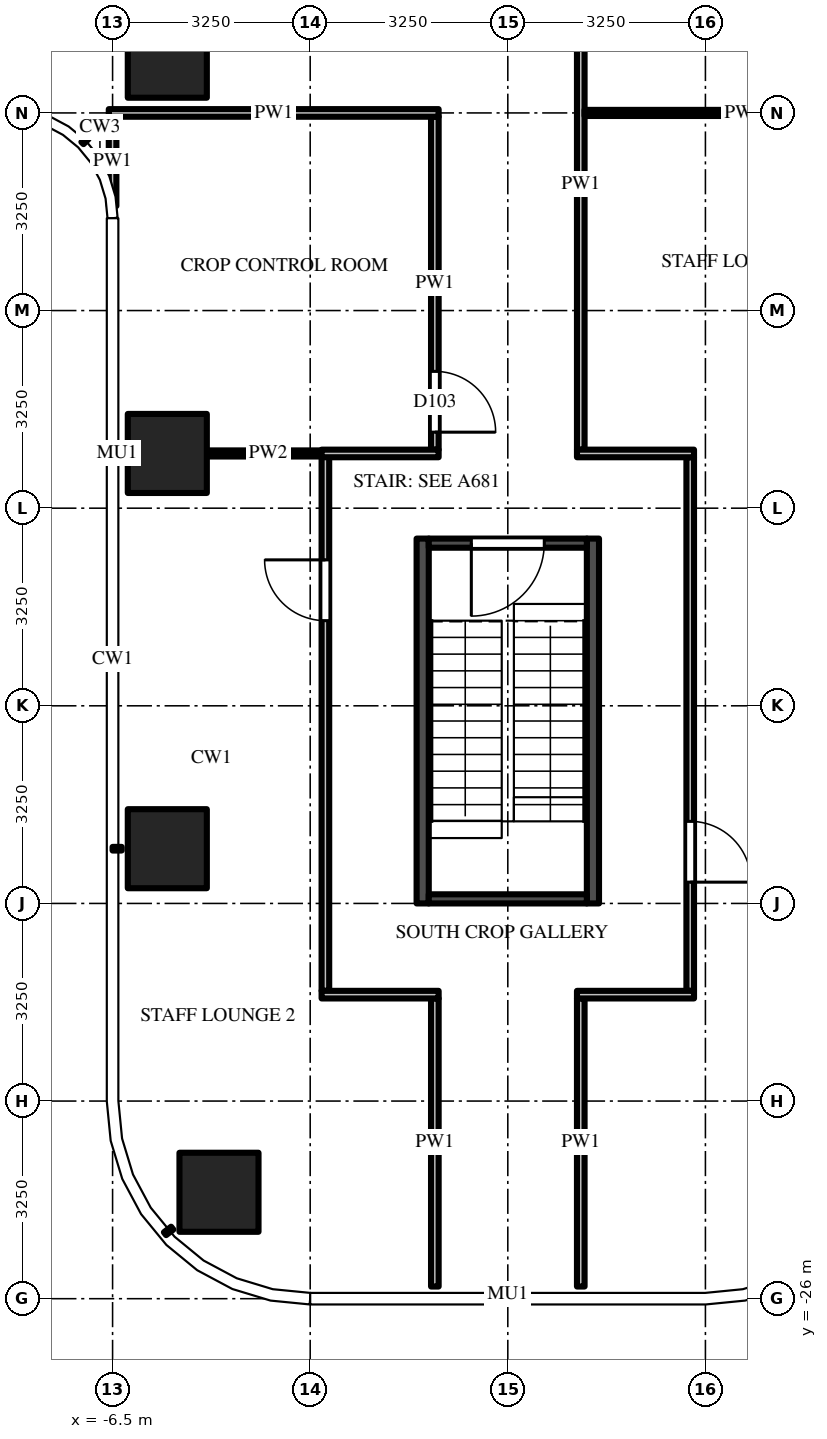
"""IFC4 building model, lengths in metres.
Left out: names, types, materials, properties, quantities, classifications, styles, units other than length and angle.
Written with IfcOpenShell. Run it as: python <this file> out.ifc"""

import sys

from ifc_helpers import new_model, si_unit, direction, frame, frame_2d, origin, origin_2d, place, context, subcontext, project, spatial, rectangle, extrude, source, transform, mapped, element, fill, save


model = new_model("IFC4")
c1 = context("Model", 3, precision=1e-05, world=origin(), true_north=direction((0.0, 1.0)))
c2 = subcontext(c1, "Body", "Model", "MODEL_VIEW")
j1 = project(units=[si_unit("LENGTHUNIT", "METRE"), si_unit("PLANEANGLEUNIT", "RADIAN")], contexts=[c1])
p1 = place(None, origin())
s1 = spatial("IfcSite", under=j1, at=p1, CompositionType="ELEMENT")
p2 = place(p1, origin())
s2 = spatial("IfcBuilding", under=s1, at=p2, CompositionType="ELEMENT")
p3 = place(p2, frame((0.0, 0.0, 151.5)))
s3 = spatial("IfcBuildingStorey", under=s2, at=p3, CompositionType="ELEMENT", Elevation=151.5)
m1 = source(origin(), c2, "Body", "SweptSolid", [
    extrude(rectangle(XDim=1.3, YDim=1.3, at=origin_2d()), origin(), (0.0, 0.0, 1.0), 4.5),
])
for number, where, z_axis, x_axis in (
    (1, (-5.6, -5.6, 0.0), (0.0, 0.0, 1.0), (1.0, 0.0, 0.0)),
    (2, (-5.6, -12.1, 0.0), (0.0, 0.0, 1.0), (1.0, 0.0, 0.0)),
    (3, (-5.6, -18.6, 0.0), (0.0, 0.0, 1.0), (1.0, 0.0, 0.0)),
    (4, (-4.75, -24.25, 0.0), (0.0, 0.0, 1.0), (1.0, 0.0, 0.0)),
):
    element("IfcColumn", number, at=place(p3, frame(where, z_axis=z_axis, x_axis=x_axis)), inside=s3, PredefinedType="COLUMN", context=c2, shape_type="MappedRepresentation", body=[
        mapped(m1, transform((0.0, 0.0, 0.0))),
    ])
m2 = source(origin(), c2, "Body", "SweptSolid", [
    extrude(rectangle(XDim=6.0, YDim=0.2, at=frame_2d((3.0, 0.0))), origin(), (0.0, 0.0, 1.0), 4.15),
])
for number, where, z_axis, x_axis in (
    (5, (1.4, -13.5, 0.0), (0.0, 0.0, 1.0), (0.0, -1.0, 0.0)),
    (6, (-1.4, -13.5, 0.0), (0.0, 0.0, 1.0), (0.0, -1.0, 0.0)),
):
    element("IfcWall", number, at=place(p3, frame(where, z_axis=z_axis, x_axis=x_axis)), inside=s3, PredefinedType="SHEAR", context=c2, shape_type="MappedRepresentation", body=[
        mapped(m2, transform((0.0, 0.0, 0.0))),
    ])
m3 = source(origin(), c2, "Body", "SweptSolid", [
    extrude(rectangle(XDim=2.6, YDim=0.15, at=frame_2d((1.3, 0.0))), origin(), (0.0, 0.0, 1.0), 4.15),
])
p4 = place(p3, frame((1.3, -13.575, 0.0), z_axis=(0.0, 0.0, 1.0), x_axis=(-1.0, 0.0, 0.0)))
e7 = element("IfcWall", 7, at=p4, inside=s3, PredefinedType="SHEAR", context=c2, shape_type="MappedRepresentation", body=[
    mapped(m3, transform((0.0, 0.0, 0.0))),
])
m4 = source(origin(), c2, "Body", "SweptSolid", [
    extrude(rectangle(XDim=1.2, YDim=2.1, at=frame_2d((0.6, 1.05))), frame((0.0, 0.085, 0.0), z_axis=(0.0, -1.0, 0.0), x_axis=(1.0, 0.0, 0.0)), (0.0, 0.0, 1.0), 0.17),
])
p5 = place(p4, frame((0.7, 0.0, 0.0)))
e8 = element("IfcOpeningElement", 8, at=p5, cuts=e7, PredefinedType="OPENING", context=c2, shape_type="MappedRepresentation", body=[
    mapped(m4, transform((0.0, 0.0, 0.0))),
])
p6 = place(p3, frame((1.3, -19.425, 0.0), z_axis=(0.0, 0.0, 1.0), x_axis=(-1.0, 0.0, 0.0)))
e9 = element("IfcWall", 9, at=p6, inside=s3, PredefinedType="SHEAR", context=c2, shape_type="MappedRepresentation", body=[
    mapped(m3, transform((0.0, 0.0, 0.0))),
])
m5 = source(origin(), c2, "Body", "SweptSolid", [
    extrude(rectangle(XDim=1.469, YDim=0.125, at=frame_2d((0.734, 0.0))), origin(), (0.0, 0.0, 1.0), 4.15),
])
p7 = place(p3, frame((-6.5, -6.562, 0.0), z_axis=(0.0, 0.0, 1.0), x_axis=(0.0, -1.0, 0.0)))
e10 = element("IfcWall", 10, at=p7, inside=s3, PredefinedType="PARTITIONING", context=c2, shape_type="MappedRepresentation", body=[
    mapped(m5, transform((0.0, 0.0, 0.0))),
])
m6 = source(origin(), c2, "Body", "SweptSolid", [
    extrude(rectangle(XDim=8.788, YDim=0.125, at=frame_2d((4.394, 0.0))), origin(), (0.0, 0.0, 1.0), 3.368),
])
p8 = place(p3, frame((-3.0, -20.938, 0.0), z_axis=(0.0, 0.0, 1.0), x_axis=(0.0, 1.0, 0.0)))
e11 = element("IfcWall", 11, at=p8, inside=s3, PredefinedType="PARTITIONING", context=c2, shape_type="MappedRepresentation", body=[
    mapped(m6, transform((0.0, 0.0, 0.0))),
])
m7 = source(origin(), c2, "Body", "SweptSolid", [
    extrude(rectangle(XDim=1.0, YDim=2.1, at=frame_2d((0.5, 1.05))), frame((0.0, 0.073, 0.0), z_axis=(0.0, -1.0, 0.0), x_axis=(1.0, 0.0, 0.0)), (0.0, 0.0, 1.0), 0.145),
])
p9 = place(p8, frame((6.087, 0.0, 0.0)))
e12 = element("IfcOpeningElement", 12, at=p9, cuts=e11, PredefinedType="OPENING", context=c2, shape_type="MappedRepresentation", body=[
    mapped(m7, transform((0.0, 0.0, 0.0))),
])
m8 = source(origin(), c2, "Body", "SweptSolid", [
    extrude(rectangle(XDim=4.738, YDim=0.125, at=frame_2d((2.369, 0.0))), origin(), (0.0, 0.0, 1.0), 3.23),
])
p10 = place(p3, frame((-1.2, -21.062, 0.0), z_axis=(0.0, 0.0, 1.0), x_axis=(0.0, -1.0, 0.0)))
e13 = element("IfcWall", 13, at=p10, inside=s3, PredefinedType="PARTITIONING", context=c2, shape_type="MappedRepresentation", body=[
    mapped(m8, transform((0.0, 0.0, 0.0))),
])
m9 = source(origin(), c2, "Body", "SweptSolid", [
    extrude(rectangle(XDim=5.475, YDim=0.125, at=frame_2d((2.738, 0.0))), origin(), (0.0, 0.0, 1.0), 3.368),
])
p11 = place(p3, frame((-1.2, -6.562, 0.0), z_axis=(0.0, 0.0, 1.0), x_axis=(0.0, -1.0, 0.0)))
e14 = element("IfcWall", 14, at=p11, inside=s3, PredefinedType="PARTITIONING", context=c2, shape_type="MappedRepresentation", body=[
    mapped(m9, transform((0.0, 0.0, 0.0))),
])
p12 = place(p11, frame((4.188, 0.0, 0.0)))
e15 = element("IfcOpeningElement", 15, at=p12, cuts=e14, PredefinedType="OPENING", context=c2, shape_type="MappedRepresentation", body=[
    mapped(m7, transform((0.0, 0.0, 0.0))),
])
p13 = place(p3, frame((1.2, -21.062, 0.0), z_axis=(0.0, 0.0, 1.0), x_axis=(0.0, -1.0, 0.0)))
e16 = element("IfcWall", 16, at=p13, inside=s3, PredefinedType="PARTITIONING", context=c2, shape_type="MappedRepresentation", body=[
    mapped(m8, transform((0.0, 0.0, 0.0))),
])
m10 = source(origin(), c2, "Body", "SweptSolid", [
    extrude(rectangle(XDim=8.725, YDim=0.125, at=frame_2d((4.363, 0.0))), origin(), (0.0, 0.0, 1.0), 3.368),
])
p14 = place(p3, frame((1.2, -3.312, 0.0), z_axis=(0.0, 0.0, 1.0), x_axis=(0.0, -1.0, 0.0)))
e17 = element("IfcWall", 17, at=p14, inside=s3, PredefinedType="PARTITIONING", context=c2, shape_type="MappedRepresentation", body=[
    mapped(m10, transform((0.0, 0.0, 0.0))),
])
p15 = place(p3, frame((3.0, -12.163, 0.0), z_axis=(0.0, 0.0, 1.0), x_axis=(0.0, -1.0, 0.0)))
e18 = element("IfcWall", 18, at=p15, inside=s3, PredefinedType="PARTITIONING", context=c2, shape_type="SweptSolid", body=[
    extrude(rectangle(XDim=8.775, YDim=0.125, at=frame_2d((4.387, 0.0))), origin(), (0.0, 0.0, 1.0), 3.368),
])
p16 = place(p15, frame((5.988, 0.0, 0.0)))
e19 = element("IfcOpeningElement", 19, at=p16, cuts=e18, PredefinedType="OPENING", context=c2, shape_type="MappedRepresentation", body=[
    mapped(m7, transform((0.0, 0.0, 0.0))),
])
m11 = source(origin(), c2, "Body", "SweptSolid", [
    extrude(rectangle(XDim=1.925, YDim=0.125, at=frame_2d((0.962, 0.0))), origin(), (0.0, 0.0, 1.0), 4.15),
])
for number, where, z_axis, x_axis in (
    (20, (-1.137, -21.0, 0.0), (0.0, 0.0, 1.0), (-1.0, 0.0, 0.0)),
    (21, (3.062, -21.0, 0.0), (0.0, 0.0, 1.0), (-1.0, 0.0, 0.0)),
):
    element("IfcWall", number, at=place(p3, frame(where, z_axis=z_axis, x_axis=x_axis)), inside=s3, PredefinedType="PARTITIONING", context=c2, shape_type="MappedRepresentation", body=[
        mapped(m11, transform((0.0, 0.0, 0.0))),
    ])
m12 = source(origin(), c2, "Body", "SweptSolid", [
    extrude(rectangle(XDim=2.012, YDim=0.1, at=frame_2d((1.006, 0.0))), origin(), (0.0, 0.0, 1.0), 3.368),
])
p17 = place(p3, frame((-4.95, -12.1, 0.0), z_axis=(0.0, 0.0, 1.0), x_axis=(1.0, 0.0, 0.0)))
e22 = element("IfcWall", 22, at=p17, inside=s3, PredefinedType="PARTITIONING", context=c2, shape_type="MappedRepresentation", body=[
    mapped(m12, transform((0.0, 0.0, 0.0))),
])
m13 = source(origin(), c2, "Body", "SweptSolid", [
    extrude(rectangle(XDim=1.925, YDim=0.125, at=frame_2d((0.962, 0.0))), origin(), (0.0, 0.0, 1.0), 3.368),
])
for number, where, z_axis, x_axis in (
    (23, (-3.062, -12.1, 0.0), (0.0, 0.0, 1.0), (1.0, 0.0, 0.0)),
    (24, (1.137, -12.1, 0.0), (0.0, 0.0, 1.0), (1.0, 0.0, 0.0)),
):
    element("IfcWall", number, at=place(p3, frame(where, z_axis=z_axis, x_axis=x_axis)), inside=s3, PredefinedType="PARTITIONING", context=c2, shape_type="MappedRepresentation", body=[
        mapped(m13, transform((0.0, 0.0, 0.0))),
    ])
m14 = source(origin(), c2, "Body", "SweptSolid", [
    extrude(rectangle(XDim=5.238, YDim=0.1, at=frame_2d((2.619, 0.0))), origin(), (0.0, 0.0, 1.0), 3.23),
])
p18 = place(p3, frame((1.262, -6.5, 0.0), z_axis=(0.0, 0.0, 1.0), x_axis=(1.0, 0.0, 0.0)))
e25 = element("IfcWall", 25, at=p18, inside=s3, PredefinedType="PARTITIONING", context=c2, shape_type="MappedRepresentation", body=[
    mapped(m14, transform((0.0, 0.0, 0.0))),
])
m15 = source(origin(), c2, "Body", "SweptSolid", [
    extrude(rectangle(XDim=5.425, YDim=0.125, at=frame_2d((2.712, 0.0))), origin(), (0.0, 0.0, 1.0), 3.23),
])
p19 = place(p3, frame((-1.137, -6.5, 0.0), z_axis=(0.0, 0.0, 1.0), x_axis=(-1.0, 0.0, 0.0)))
e26 = element("IfcWall", 26, at=p19, inside=s3, PredefinedType="PARTITIONING", context=c2, shape_type="MappedRepresentation", body=[
    mapped(m15, transform((0.0, 0.0, 0.0))),
])
m16 = source(origin(), c2, "Body", "SweptSolid", [
    extrude(rectangle(XDim=1.2, YDim=2.1, at=frame_2d((0.6, 1.05))), frame((0.0, 0.025, 0.0), z_axis=(0.0, -1.0, 0.0), x_axis=(1.0, 0.0, 0.0)), (0.0, 0.0, 1.0), 0.05),
])
p20 = place(p5, origin())
e27 = element("IfcDoor", 27, at=p20, inside=s3, OperationType="SINGLE_SWING_RIGHT", PredefinedType="DOOR", context=c2, shape_type="MappedRepresentation", body=[
    mapped(m16, transform((0.0, 0.0, 0.0))),
])
fill(e8, e27)
m17 = source(origin(), c2, "Body", "SweptSolid", [
    extrude(rectangle(XDim=1.0, YDim=2.1, at=frame_2d((0.5, 1.05))), frame((0.0, 0.025, 0.0), z_axis=(0.0, -1.0, 0.0), x_axis=(1.0, 0.0, 0.0)), (0.0, 0.0, 1.0), 0.05),
])
p21 = place(p16, origin())
e28 = element("IfcDoor", 28, at=p21, inside=s3, OperationType="SINGLE_SWING_RIGHT", PredefinedType="DOOR", context=c2, shape_type="MappedRepresentation", body=[
    mapped(m17, transform((0.0, 0.0, 0.0))),
])
fill(e19, e28)
p22 = place(p9, origin())
e29 = element("IfcDoor", 29, at=p22, inside=s3, OperationType="SINGLE_SWING_RIGHT", PredefinedType="DOOR", context=c2, shape_type="MappedRepresentation", body=[
    mapped(m17, transform((0.0, 0.0, 0.0))),
])
fill(e12, e29)
p23 = place(p12, origin())
e30 = element("IfcDoor", 30, at=p23, inside=s3, OperationType="SINGLE_SWING_RIGHT", PredefinedType="DOOR", context=c2, shape_type="MappedRepresentation", body=[
    mapped(m17, transform((0.0, 0.0, 0.0))),
])
fill(e15, e30)
save(model, sys.argv[1])
